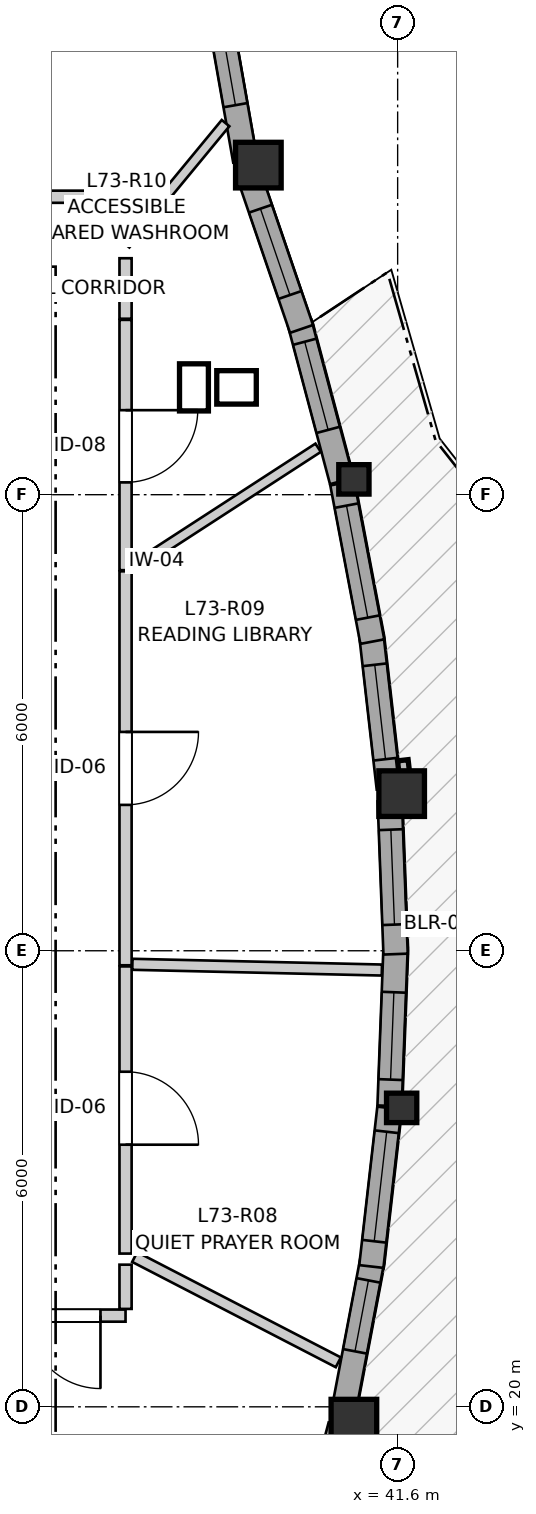
"""IFC4 building model, lengths in metres.
Left out: names, types, materials, properties, quantities, classifications, styles, units other than length and angle.
Written with IfcOpenShell. Run it as: python <this file> out.ifc"""

import sys

from ifc_helpers import new_model, si_unit, direction, frame, frame_2d, origin, origin_2d, place, context, subcontext, project, spatial, rectangle, i_section, extrude, source, transform, mapped, element, fill, save


model = new_model("IFC4")
c1 = context("Model", 3, precision=1e-05, world=origin(), true_north=direction((0.0, 1.0)))
c2 = subcontext(c1, "Body", "Model", "MODEL_VIEW")
j1 = project(units=[si_unit("LENGTHUNIT", "METRE"), si_unit("PLANEANGLEUNIT", "RADIAN")], contexts=[c1])
p1 = place(None, origin())
s1 = spatial("IfcSite", under=j1, at=p1, CompositionType="ELEMENT")
p2 = place(p1, origin())
s2 = spatial("IfcBuilding", under=s1, at=p2, CompositionType="ELEMENT")
p3 = place(p2, frame((0.0, 0.0, 243.6)))
s3 = spatial("IfcBuildingStorey", under=s2, at=p3, CompositionType="ELEMENT", Elevation=243.6)
m1 = source(origin(), c2, "Body", "SweptSolid", [
    extrude(rectangle(XDim=0.6, YDim=0.6, at=origin_2d()), origin(), (0.0, 0.0, 1.0), 2.96),
])
p4 = place(p3, frame((41.024, 19.798, 0.0), z_axis=(0.0, 0.0, 1.0), x_axis=(1.0, 0.0, 0.0)))
e1 = element("IfcColumn", 1, at=p4, inside=s3, PredefinedType="COLUMN", context=c2, shape_type="MappedRepresentation", body=[
    mapped(m1, transform((0.0, 0.0, 0.0), x_axis=(1.0, 0.0, 0.0), y_axis=(0.0, 1.0, 0.0), z_axis=(0.0, 0.0, 1.0), scale=1.0)),
])
m2 = source(origin(), c2, "Body", "SweptSolid", [
    extrude(i_section(OverallWidth=0.398, OverallDepth=0.387, WebThickness=0.019, FlangeThickness=0.03, FilletRadius=0.015, at=origin_2d()), origin(), (0.0, 0.0, 1.0), 2.96),
])
p5 = place(p3, frame((41.653, 23.933, 0.0), z_axis=(0.0, 0.0, 1.0), x_axis=(1.0, 0.0, 0.0)))
e2 = element("IfcColumn", 2, at=p5, inside=s3, PredefinedType="PILASTER", context=c2, shape_type="MappedRepresentation", body=[
    mapped(m2, transform((0.0, 0.0, 0.0), x_axis=(1.0, 0.0, 0.0), y_axis=(0.0, 1.0, 0.0), z_axis=(0.0, 0.0, 1.0), scale=1.0)),
])
p6 = place(p3, frame((41.653, 28.067, 0.0), z_axis=(0.0, 0.0, 1.0), x_axis=(1.0, 0.0, 0.0)))
e3 = element("IfcColumn", 3, at=p6, inside=s3, PredefinedType="COLUMN", context=c2, shape_type="MappedRepresentation", body=[
    mapped(m1, transform((0.0, 0.0, 0.0), x_axis=(1.0, 0.0, 0.0), y_axis=(0.0, 1.0, 0.0), z_axis=(0.0, 0.0, 1.0), scale=1.0)),
])
p7 = place(p3, frame((41.024, 32.202, 0.0), z_axis=(0.0, 0.0, 1.0), x_axis=(1.0, 0.0, 0.0)))
e4 = element("IfcColumn", 4, at=p7, inside=s3, PredefinedType="PILASTER", context=c2, shape_type="MappedRepresentation", body=[
    mapped(m2, transform((0.0, 0.0, 0.0), x_axis=(1.0, 0.0, 0.0), y_axis=(0.0, 1.0, 0.0), z_axis=(0.0, 0.0, 1.0), scale=1.0)),
])
p8 = place(p3, frame((39.768, 36.336, 0.0), z_axis=(0.0, 0.0, 1.0), x_axis=(1.0, 0.0, 0.0)))
e5 = element("IfcColumn", 5, at=p8, inside=s3, PredefinedType="COLUMN", context=c2, shape_type="MappedRepresentation", body=[
    mapped(m1, transform((0.0, 0.0, 0.0), x_axis=(1.0, 0.0, 0.0), y_axis=(0.0, 1.0, 0.0), z_axis=(0.0, 0.0, 1.0), scale=1.0)),
])
p9 = place(p3, frame((40.31, 17.736, 0.0), z_axis=(0.0, 0.0, 1.0), x_axis=(0.257094755125, 0.966386199657, 0.0)))
e6 = element("IfcWall", 6, at=p9, inside=s3, PredefinedType="SOLIDWALL", context=c2, shape_type="SweptSolid", body=[
    extrude(rectangle(XDim=2.087, YDim=0.32, at=frame_2d((1.043, 0.0))), origin(), (0.0, 0.0, 1.0), 2.58),
])
p10 = place(p9, frame((0.24, 0.0, 0.0)))
e7 = element("IfcOpeningElement", 7, at=p10, cuts=e6, PredefinedType="OPENING", context=c2, shape_type="SweptSolid", body=[
    extrude(rectangle(XDim=1.0, YDim=2.1, at=frame_2d((0.5, 1.05))), frame((0.0, 0.17, 0.0), z_axis=(0.0, -1.0, 0.0), x_axis=(1.0, 0.0, 0.0)), (0.0, 0.0, 1.0), 0.34),
])
p11 = place(p3, frame((40.884, 19.917, 0.0), z_axis=(0.0, 0.0, 1.0), x_axis=(0.186658349395, 0.98242488802, 0.0)))
e8 = element("IfcWall", 8, at=p11, inside=s3, PredefinedType="SOLIDWALL", context=c2, shape_type="SweptSolid", body=[
    extrude(rectangle(XDim=2.052, YDim=0.32, at=frame_2d((1.026, 0.0))), origin(), (0.0, 0.0, 1.0), 2.58),
])
p12 = place(p11, frame((0.828, 0.0, 0.82)))
e9 = element("IfcOpeningElement", 9, at=p12, cuts=e8, PredefinedType="OPENING", context=c2, shape_type="SweptSolid", body=[
    extrude(rectangle(XDim=0.95, YDim=1.35, at=frame_2d((0.475, 0.675))), frame((0.0, 0.17, 0.0), z_axis=(0.0, -1.0, 0.0), x_axis=(1.0, 0.0, 0.0)), (0.0, 0.0, 1.0), 0.34),
])
p13 = place(p3, frame((41.254, 21.846, 0.0), z_axis=(0.0, 0.0, 1.0), x_axis=(0.113303807423, 0.993560389319, 0.0)))
e10 = element("IfcWall", 10, at=p13, inside=s3, PredefinedType="SOLIDWALL", context=c2, shape_type="SweptSolid", body=[
    extrude(rectangle(XDim=2.099, YDim=0.32, at=frame_2d((1.049, 0.0))), origin(), (0.0, 0.0, 1.0), 2.58),
])
p14 = place(p13, frame((0.334, 0.0, 0.82)))
e11 = element("IfcOpeningElement", 11, at=p14, cuts=e10, PredefinedType="OPENING", context=c2, shape_type="SweptSolid", body=[
    extrude(rectangle(XDim=1.45, YDim=1.25, at=frame_2d((0.725, 0.625))), frame((0.0, 0.17, 0.0), z_axis=(0.0, -1.0, 0.0), x_axis=(1.0, 0.0, 0.0)), (0.0, 0.0, 1.0), 0.34),
])
p15 = place(p3, frame((41.494, 23.959, 0.0), z_axis=(0.0, 0.0, 1.0), x_axis=(0.038028678064, 0.999276648203, 0.0)))
e12 = element("IfcWall", 12, at=p15, inside=s3, PredefinedType="SOLIDWALL", context=c2, shape_type="SweptSolid", body=[
    extrude(rectangle(XDim=2.086, YDim=0.32, at=frame_2d((1.043, 0.0))), origin(), (0.0, 0.0, 1.0), 2.58),
])
p16 = place(p15, frame((0.346, 0.0, 0.82)))
e13 = element("IfcOpeningElement", 13, at=p16, cuts=e12, PredefinedType="OPENING", context=c2, shape_type="SweptSolid", body=[
    extrude(rectangle(XDim=1.15, YDim=1.2, at=frame_2d((0.575, 0.6))), frame((0.0, 0.17, 0.0), z_axis=(0.0, -1.0, 0.0), x_axis=(1.0, 0.0, 0.0)), (0.0, 0.0, 1.0), 0.34),
])
p17 = place(p3, frame((41.573, 25.956, 0.0), z_axis=(0.0, 0.0, 1.0), x_axis=(-0.038014663796, 0.999277181435, 0.0)))
e14 = element("IfcWall", 14, at=p17, inside=s3, PredefinedType="SOLIDWALL", context=c2, shape_type="SweptSolid", body=[
    extrude(rectangle(XDim=2.017, YDim=0.32, at=frame_2d((1.008, 0.0))), origin(), (0.0, 0.0, 1.0), 2.58),
])
p18 = place(p17, frame((0.388, 0.0, 0.82)))
e15 = element("IfcOpeningElement", 15, at=p18, cuts=e14, PredefinedType="OPENING", context=c2, shape_type="SweptSolid", body=[
    extrude(rectangle(XDim=1.25, YDim=1.35, at=frame_2d((0.625, 0.675))), frame((0.0, 0.17, 0.0), z_axis=(0.0, -1.0, 0.0), x_axis=(1.0, 0.0, 0.0)), (0.0, 0.0, 1.0), 0.34),
])
p19 = place(p3, frame((41.484, 28.138, 0.0), z_axis=(0.0, 0.0, 1.0), x_axis=(-0.113244511591, 0.993567149515, 0.0)))
e16 = element("IfcWall", 16, at=p19, inside=s3, PredefinedType="SOLIDWALL", context=c2, shape_type="SweptSolid", body=[
    extrude(rectangle(XDim=2.029, YDim=0.32, at=frame_2d((1.014, 0.0))), origin(), (0.0, 0.0, 1.0), 2.58),
])
p20 = place(p19, frame((0.384, 0.0, 0.82)))
e17 = element("IfcOpeningElement", 17, at=p20, cuts=e16, PredefinedType="OPENING", context=c2, shape_type="SweptSolid", body=[
    extrude(rectangle(XDim=1.25, YDim=1.35, at=frame_2d((0.625, 0.675))), frame((0.0, 0.17, 0.0), z_axis=(0.0, -1.0, 0.0), x_axis=(1.0, 0.0, 0.0)), (0.0, 0.0, 1.0), 0.34),
])
p21 = place(p3, frame((41.267, 30.067, 0.0), z_axis=(0.0, 0.0, 1.0), x_axis=(-0.186705057177, 0.982416012504, 0.0)))
e18 = element("IfcWall", 18, at=p21, inside=s3, PredefinedType="SOLIDWALL", context=c2, shape_type="SweptSolid", body=[
    extrude(rectangle(XDim=2.122, YDim=0.32, at=frame_2d((1.061, 0.0))), origin(), (0.0, 0.0, 1.0), 2.58),
])
p22 = place(p21, frame((0.321, 0.0, 0.82)))
e19 = element("IfcOpeningElement", 19, at=p22, cuts=e18, PredefinedType="OPENING", context=c2, shape_type="SweptSolid", body=[
    extrude(rectangle(XDim=1.5, YDim=1.45, at=frame_2d((0.75, 0.725))), frame((0.0, 0.17, 0.0), z_axis=(0.0, -1.0, 0.0), x_axis=(1.0, 0.0, 0.0)), (0.0, 0.0, 1.0), 0.34),
])
p23 = place(p3, frame((40.865, 32.18, 0.0), z_axis=(0.0, 0.0, 1.0), x_axis=(-0.257021579051, 0.966405664254, 0.0)))
e20 = element("IfcWall", 20, at=p23, inside=s3, PredefinedType="SOLIDWALL", context=c2, shape_type="SweptSolid", body=[
    extrude(rectangle(XDim=2.157, YDim=0.32, at=frame_2d((1.079, 0.0))), origin(), (0.0, 0.0, 1.0), 2.58),
])
p24 = place(p23, frame((0.696, 0.0, 0.82)))
e21 = element("IfcOpeningElement", 21, at=p24, cuts=e20, PredefinedType="OPENING", context=c2, shape_type="SweptSolid", body=[
    extrude(rectangle(XDim=1.2, YDim=1.45, at=frame_2d((0.6, 0.725))), frame((0.0, 0.17, 0.0), z_axis=(0.0, -1.0, 0.0), x_axis=(1.0, 0.0, 0.0)), (0.0, 0.0, 1.0), 0.34),
])
p25 = place(p3, frame((40.335, 34.181, 0.0), z_axis=(0.0, 0.0, 1.0), x_axis=(-0.323601383087, 0.946193502865, 0.0)))
e22 = element("IfcWall", 22, at=p25, inside=s3, PredefinedType="SOLIDWALL", context=c2, shape_type="SweptSolid", body=[
    extrude(rectangle(XDim=2.133, YDim=0.32, at=frame_2d((1.066, 0.0))), origin(), (0.0, 0.0, 1.0), 2.58),
])
p26 = place(p25, frame((0.471, 0.0, 0.82)))
e23 = element("IfcOpeningElement", 23, at=p26, cuts=e22, PredefinedType="OPENING", context=c2, shape_type="SweptSolid", body=[
    extrude(rectangle(XDim=1.2, YDim=1.45, at=frame_2d((0.6, 0.725))), frame((0.0, 0.17, 0.0), z_axis=(0.0, -1.0, 0.0), x_axis=(1.0, 0.0, 0.0)), (0.0, 0.0, 1.0), 0.34),
])
p27 = place(p3, frame((39.594, 36.397, 0.0), z_axis=(0.0, 0.0, 1.0), x_axis=(-0.173671780312, 0.984803590937, 0.0)))
e24 = element("IfcWall", 24, at=p27, inside=s3, PredefinedType="SOLIDWALL", context=c2, shape_type="SweptSolid", body=[
    extrude(rectangle(XDim=1.962, YDim=0.32, at=frame_2d((0.981, 0.0))), origin(), (0.0, 0.0, 1.0), 2.58),
])
p28 = place(p27, frame((0.739, 0.0, 0.82)))
e25 = element("IfcOpeningElement", 25, at=p28, cuts=e24, PredefinedType="OPENING", context=c2, shape_type="SweptSolid", body=[
    extrude(rectangle(XDim=0.95, YDim=1.35, at=frame_2d((0.475, 0.675))), frame((0.0, 0.17, 0.0), z_axis=(0.0, -1.0, 0.0), x_axis=(1.0, 0.0, 0.0)), (0.0, 0.0, 1.0), 0.34),
])
p29 = place(p3, frame((38.02, 30.992, 0.0), z_axis=(0.0, 0.0, 1.0), x_axis=(0.0, -1.0, 0.0)))
e26 = element("IfcWall", 26, at=p29, inside=s3, PredefinedType="PARTITIONING", context=c2, shape_type="SweptSolid", body=[
    extrude(rectangle(XDim=5.183, YDim=0.16, at=frame_2d((2.591, 0.0))), origin(), (0.0, 0.0, 1.0), 2.628),
])
p30 = place(p29, frame((2.113, 0.0, 0.0)))
e27 = element("IfcOpeningElement", 27, at=p30, cuts=e26, PredefinedType="OPENING", context=c2, shape_type="SweptSolid", body=[
    extrude(rectangle(XDim=0.96, YDim=2.1, at=frame_2d((0.48, 1.05))), frame((0.0, 0.09, 0.0), z_axis=(0.0, -1.0, 0.0), x_axis=(1.0, 0.0, 0.0)), (0.0, 0.0, 1.0), 0.18),
])
p31 = place(p3, frame((38.02, 25.794, 0.0), z_axis=(0.0, 0.0, 1.0), x_axis=(0.0, -1.0, 0.0)))
e28 = element("IfcWall", 28, at=p31, inside=s3, PredefinedType="PARTITIONING", context=c2, shape_type="SweptSolid", body=[
    extrude(rectangle(XDim=3.778, YDim=0.16, at=frame_2d((1.889, 0.0))), origin(), (0.0, 0.0, 1.0), 2.628),
])
p32 = place(p31, frame((1.385, 0.0, 0.0)))
e29 = element("IfcOpeningElement", 29, at=p32, cuts=e28, PredefinedType="OPENING", context=c2, shape_type="SweptSolid", body=[
    extrude(rectangle(XDim=0.96, YDim=2.1, at=frame_2d((0.48, 1.05))), frame((0.0, 0.09, 0.0), z_axis=(0.0, -1.0, 0.0), x_axis=(1.0, 0.0, 0.0)), (0.0, 0.0, 1.0), 0.18),
])
p33 = place(p3, frame((38.02, 34.3, 0.0), z_axis=(0.0, 0.0, 1.0), x_axis=(0.0, -1.0, 0.0)))
e30 = element("IfcWall", 30, at=p33, inside=s3, PredefinedType="PARTITIONING", context=c2, shape_type="SweptSolid", body=[
    extrude(rectangle(XDim=3.293, YDim=0.16, at=frame_2d((1.646, 0.0))), origin(), (0.0, 0.0, 1.0), 2.628),
])
p34 = place(p33, frame((1.188, 0.0, 0.0)))
e31 = element("IfcOpeningElement", 31, at=p34, cuts=e30, PredefinedType="OPENING", context=c2, shape_type="SweptSolid", body=[
    extrude(rectangle(XDim=0.95, YDim=2.1, at=frame_2d((0.475, 1.05))), frame((0.0, 0.09, 0.0), z_axis=(0.0, -1.0, 0.0), x_axis=(1.0, 0.0, 0.0)), (0.0, 0.0, 1.0), 0.18),
])
p35 = place(p3, frame((38.02, 21.2, 0.0), z_axis=(0.0, 0.0, 1.0), x_axis=(-1.0, 0.0, 0.0)))
e32 = element("IfcWall", 32, at=p35, inside=s3, PredefinedType="PARTITIONING", context=c2, shape_type="SweptSolid", body=[
    extrude(rectangle(XDim=1.612, YDim=0.16, at=frame_2d((0.806, 0.0))), origin(), (0.0, 0.0, 1.0), 2.96),
])
p36 = place(p35, frame((0.33, 0.0, 0.0)))
e33 = element("IfcOpeningElement", 33, at=p36, cuts=e32, PredefinedType="OPENING", context=c2, shape_type="SweptSolid", body=[
    extrude(rectangle(XDim=0.96, YDim=2.1, at=frame_2d((0.48, 1.05))), frame((0.0, 0.09, 0.0), z_axis=(0.0, -1.0, 0.0), x_axis=(1.0, 0.0, 0.0)), (0.0, 0.0, 1.0), 0.18),
])
p37 = place(p3, frame((38.11, 25.822, 0.0), z_axis=(0.0, 0.0, 1.0), x_axis=(0.999734335157, -0.023049058746, 0.0)))
e34 = element("IfcWall", 34, at=p37, inside=s3, PredefinedType="PARTITIONING", context=c2, shape_type="SweptSolid", body=[
    extrude(rectangle(XDim=3.284, YDim=0.145, at=frame_2d((1.642, 0.0))), origin(), (0.0, 0.0, 1.0), 2.96),
])
p38 = place(p3, frame((38.14, 21.971, 0.0), z_axis=(0.0, 0.0, 1.0), x_axis=(0.888273451666, -0.459315006357, 0.0)))
e35 = element("IfcWall", 35, at=p38, inside=s3, PredefinedType="PARTITIONING", context=c2, shape_type="SweptSolid", body=[
    extrude(rectangle(XDim=3.016, YDim=0.145, at=frame_2d((1.508, 0.0))), origin(), (0.0, 0.0, 1.0), 2.96),
])
p39 = place(p3, frame((38.142, 31.053, 0.0), z_axis=(0.0, 0.0, 1.0), x_axis=(0.839000059055, 0.544131326892, 0.0)))
e36 = element("IfcWall", 36, at=p39, inside=s3, PredefinedType="PARTITIONING", context=c2, shape_type="SweptSolid", body=[
    extrude(rectangle(XDim=2.875, YDim=0.13, at=frame_2d((1.438, 0.0))), origin(), (0.0, 0.0, 1.0), 2.96),
])
p40 = place(p3, frame((38.02, 35.294, 0.0), z_axis=(0.0, 0.0, 1.0), x_axis=(0.636518208935, 0.771261673943, 0.0)))
e37 = element("IfcWall", 37, at=p40, inside=s3, PredefinedType="PARTITIONING", context=c2, shape_type="SweptSolid", body=[
    extrude(rectangle(XDim=2.067, YDim=0.13, at=frame_2d((1.034, 0.0))), origin(), (0.0, 0.0, 1.0), 2.96),
])
p41 = place(p3, frame((36.415, 35.92, 0.0), z_axis=(0.0, 0.0, 1.0), x_axis=(1.0, 0.0, 0.0)))
e38 = element("IfcWall", 38, at=p41, inside=s3, PredefinedType="PARTITIONING", context=c2, shape_type="SweptSolid", body=[
    extrude(rectangle(XDim=1.605, YDim=0.16, at=frame_2d((0.802, 0.0))), origin(), (0.0, 0.0, 1.0), 2.598),
])
p42 = place(p3, frame((38.02, 34.315, 0.0), z_axis=(0.0, 0.0, 1.0), x_axis=(0.0, 1.0, 0.0)))
e39 = element("IfcWall", 39, at=p42, inside=s3, PredefinedType="PARTITIONING", context=c2, shape_type="SweptSolid", body=[
    extrude(rectangle(XDim=0.796, YDim=0.16, at=frame_2d((0.398, 0.0))), origin(), (0.0, 0.0, 1.0), 2.96),
])
p43 = place(p3, frame((38.02, 21.288, 0.0), z_axis=(0.0, 0.0, 1.0), x_axis=(0.0, 1.0, 0.0)))
e40 = element("IfcWall", 40, at=p43, inside=s3, PredefinedType="PARTITIONING", context=c2, shape_type="SweptSolid", body=[
    extrude(rectangle(XDim=0.582, YDim=0.16, at=frame_2d((0.291, 0.0))), origin(), (0.0, 0.0, 1.0), 2.628),
])
p44 = place(p3, frame((38.02, 35.423, 0.0), z_axis=(0.0, 0.0, 1.0), x_axis=(0.0, 1.0, 0.0)))
e41 = element("IfcWall", 41, at=p44, inside=s3, PredefinedType="PARTITIONING", context=c2, shape_type="SweptSolid", body=[
    extrude(rectangle(XDim=0.497, YDim=0.16, at=frame_2d((0.249, 0.0))), origin(), (0.0, 0.0, 1.0), 2.96),
])
m3 = source(origin(), c2, "Body", "SweptSolid", [
    extrude(rectangle(XDim=0.95, YDim=1.35, at=frame_2d((0.475, 0.675))), frame((0.0, 0.03, 0.0), z_axis=(0.0, -1.0, 0.0), x_axis=(1.0, 0.0, 0.0)), (0.0, 0.0, 1.0), 0.06),
])
p45 = place(p12, origin())
e42 = element("IfcWindow", 42, at=p45, inside=s3, PartitioningType="SINGLE_PANEL", PredefinedType="WINDOW", context=c2, shape_type="MappedRepresentation", body=[
    mapped(m3, transform((0.0, 0.0, 0.0), x_axis=(1.0, 0.0, 0.0), y_axis=(0.0, 1.0, 0.0), z_axis=(0.0, 0.0, 1.0), scale=1.0)),
])
fill(e9, e42)
m4 = source(origin(), c2, "Body", "SweptSolid", [
    extrude(rectangle(XDim=1.45, YDim=1.25, at=frame_2d((0.725, 0.625))), frame((0.0, 0.03, 0.0), z_axis=(0.0, -1.0, 0.0), x_axis=(1.0, 0.0, 0.0)), (0.0, 0.0, 1.0), 0.06),
])
p46 = place(p14, origin())
e43 = element("IfcWindow", 43, at=p46, inside=s3, PartitioningType="SINGLE_PANEL", PredefinedType="WINDOW", context=c2, shape_type="MappedRepresentation", body=[
    mapped(m4, transform((0.0, 0.0, 0.0), x_axis=(1.0, 0.0, 0.0), y_axis=(0.0, 1.0, 0.0), z_axis=(0.0, 0.0, 1.0), scale=1.0)),
])
fill(e11, e43)
m5 = source(origin(), c2, "Body", "SweptSolid", [
    extrude(rectangle(XDim=1.15, YDim=1.2, at=frame_2d((0.575, 0.6))), frame((0.0, 0.03, 0.0), z_axis=(0.0, -1.0, 0.0), x_axis=(1.0, 0.0, 0.0)), (0.0, 0.0, 1.0), 0.06),
])
p47 = place(p16, origin())
e44 = element("IfcWindow", 44, at=p47, inside=s3, PartitioningType="SINGLE_PANEL", PredefinedType="WINDOW", context=c2, shape_type="MappedRepresentation", body=[
    mapped(m5, transform((0.0, 0.0, 0.0), x_axis=(1.0, 0.0, 0.0), y_axis=(0.0, 1.0, 0.0), z_axis=(0.0, 0.0, 1.0), scale=1.0)),
])
fill(e13, e44)
m6 = source(origin(), c2, "Body", "SweptSolid", [
    extrude(rectangle(XDim=1.25, YDim=1.35, at=frame_2d((0.625, 0.675))), frame((0.0, 0.03, 0.0), z_axis=(0.0, -1.0, 0.0), x_axis=(1.0, 0.0, 0.0)), (0.0, 0.0, 1.0), 0.06),
])
p48 = place(p18, origin())
e45 = element("IfcWindow", 45, at=p48, inside=s3, PartitioningType="SINGLE_PANEL", PredefinedType="WINDOW", context=c2, shape_type="MappedRepresentation", body=[
    mapped(m6, transform((0.0, 0.0, 0.0), x_axis=(1.0, 0.0, 0.0), y_axis=(0.0, 1.0, 0.0), z_axis=(0.0, 0.0, 1.0), scale=1.0)),
])
fill(e15, e45)
p49 = place(p20, origin())
e46 = element("IfcWindow", 46, at=p49, inside=s3, PartitioningType="SINGLE_PANEL", PredefinedType="WINDOW", context=c2, shape_type="MappedRepresentation", body=[
    mapped(m6, transform((0.0, 0.0, 0.0), x_axis=(1.0, 0.0, 0.0), y_axis=(0.0, 1.0, 0.0), z_axis=(0.0, 0.0, 1.0), scale=1.0)),
])
fill(e17, e46)
m7 = source(origin(), c2, "Body", "SweptSolid", [
    extrude(rectangle(XDim=1.5, YDim=1.45, at=frame_2d((0.75, 0.725))), frame((0.0, 0.03, 0.0), z_axis=(0.0, -1.0, 0.0), x_axis=(1.0, 0.0, 0.0)), (0.0, 0.0, 1.0), 0.06),
])
p50 = place(p22, origin())
e47 = element("IfcWindow", 47, at=p50, inside=s3, PartitioningType="SINGLE_PANEL", PredefinedType="WINDOW", context=c2, shape_type="MappedRepresentation", body=[
    mapped(m7, transform((0.0, 0.0, 0.0), x_axis=(1.0, 0.0, 0.0), y_axis=(0.0, 1.0, 0.0), z_axis=(0.0, 0.0, 1.0), scale=1.0)),
])
fill(e19, e47)
m8 = source(origin(), c2, "Body", "SweptSolid", [
    extrude(rectangle(XDim=1.2, YDim=1.45, at=frame_2d((0.6, 0.725))), frame((0.0, 0.03, 0.0), z_axis=(0.0, -1.0, 0.0), x_axis=(1.0, 0.0, 0.0)), (0.0, 0.0, 1.0), 0.06),
])
p51 = place(p24, origin())
e48 = element("IfcWindow", 48, at=p51, inside=s3, PartitioningType="SINGLE_PANEL", PredefinedType="WINDOW", context=c2, shape_type="MappedRepresentation", body=[
    mapped(m8, transform((0.0, 0.0, 0.0), x_axis=(1.0, 0.0, 0.0), y_axis=(0.0, 1.0, 0.0), z_axis=(0.0, 0.0, 1.0), scale=1.0)),
])
fill(e21, e48)
p52 = place(p26, origin())
e49 = element("IfcWindow", 49, at=p52, inside=s3, PartitioningType="SINGLE_PANEL", PredefinedType="WINDOW", context=c2, shape_type="MappedRepresentation", body=[
    mapped(m8, transform((0.0, 0.0, 0.0), x_axis=(1.0, 0.0, 0.0), y_axis=(0.0, 1.0, 0.0), z_axis=(0.0, 0.0, 1.0), scale=1.0)),
])
fill(e23, e49)
p53 = place(p28, origin())
e50 = element("IfcWindow", 50, at=p53, inside=s3, PartitioningType="SINGLE_PANEL", PredefinedType="WINDOW", context=c2, shape_type="MappedRepresentation", body=[
    mapped(m3, transform((0.0, 0.0, 0.0), x_axis=(1.0, 0.0, 0.0), y_axis=(0.0, 1.0, 0.0), z_axis=(0.0, 0.0, 1.0), scale=1.0)),
])
fill(e25, e50)
m9 = source(origin(), c2, "Body", "SweptSolid", [
    extrude(rectangle(XDim=0.96, YDim=2.1, at=frame_2d((0.48, 1.05))), frame((0.0, 0.025, 0.0), z_axis=(0.0, -1.0, 0.0), x_axis=(1.0, 0.0, 0.0)), (0.0, 0.0, 1.0), 0.05),
])
p54 = place(p30, origin())
e51 = element("IfcDoor", 51, at=p54, inside=s3, OperationType="SINGLE_SWING_LEFT", PredefinedType="DOOR", context=c2, shape_type="MappedRepresentation", body=[
    mapped(m9, transform((0.0, 0.0, 0.0), x_axis=(1.0, 0.0, 0.0), y_axis=(0.0, 1.0, 0.0), z_axis=(0.0, 0.0, 1.0), scale=1.0)),
])
fill(e27, e51)
p55 = place(p32, origin())
e52 = element("IfcDoor", 52, at=p55, inside=s3, OperationType="SINGLE_SWING_RIGHT", PredefinedType="DOOR", context=c2, shape_type="MappedRepresentation", body=[
    mapped(m9, transform((0.0, 0.0, 0.0), x_axis=(1.0, 0.0, 0.0), y_axis=(0.0, 1.0, 0.0), z_axis=(0.0, 0.0, 1.0), scale=1.0)),
])
fill(e29, e52)
m10 = source(origin(), c2, "Body", "SweptSolid", [
    extrude(rectangle(XDim=0.95, YDim=2.1, at=frame_2d((0.475, 1.05))), frame((0.0, 0.025, 0.0), z_axis=(0.0, -1.0, 0.0), x_axis=(1.0, 0.0, 0.0)), (0.0, 0.0, 1.0), 0.05),
])
p56 = place(p34, origin())
e53 = element("IfcDoor", 53, at=p56, inside=s3, OperationType="SINGLE_SWING_LEFT", PredefinedType="DOOR", context=c2, shape_type="MappedRepresentation", body=[
    mapped(m10, transform((0.0, 0.0, 0.0), x_axis=(1.0, 0.0, 0.0), y_axis=(0.0, 1.0, 0.0), z_axis=(0.0, 0.0, 1.0), scale=1.0)),
])
fill(e31, e53)
p57 = place(p36, origin())
e54 = element("IfcDoor", 54, at=p57, inside=s3, OperationType="SINGLE_SWING_LEFT", PredefinedType="DOOR", context=c2, shape_type="MappedRepresentation", body=[
    mapped(m9, transform((0.0, 0.0, 0.0), x_axis=(1.0, 0.0, 0.0), y_axis=(0.0, 1.0, 0.0), z_axis=(0.0, 0.0, 1.0), scale=1.0)),
])
fill(e33, e54)
save(model, sys.argv[1])
